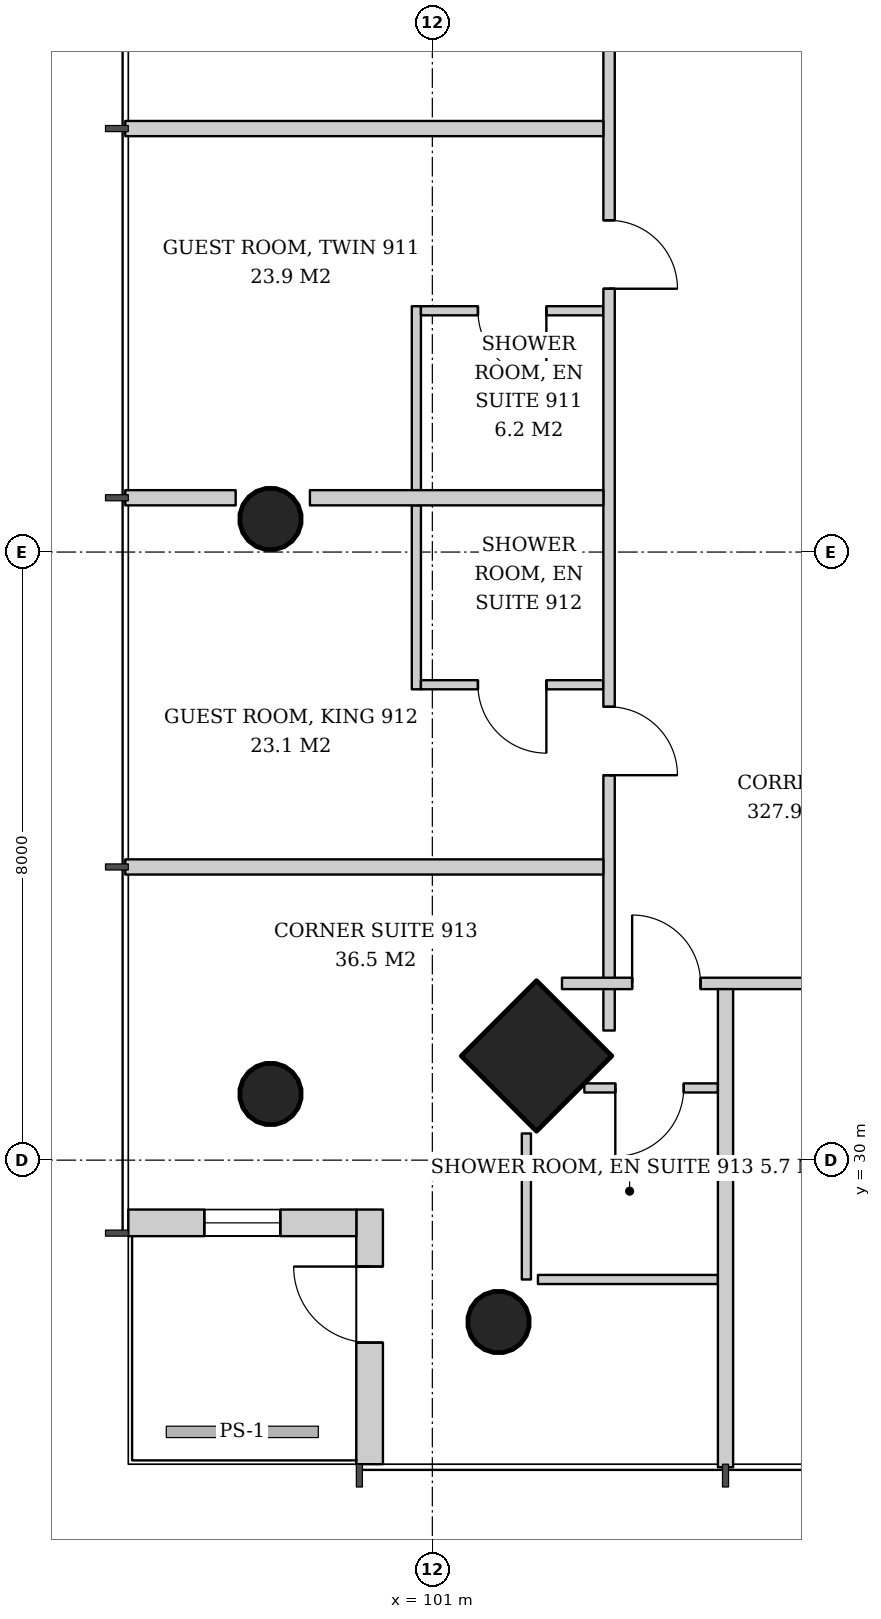
"""IFC4 building model, lengths in metres.
Left out: names, types, materials, properties, quantities, classifications, styles, units other than length and angle.
Written with IfcOpenShell. Run it as: python <this file> out.ifc"""

import sys

from ifc_helpers import new_model, si_unit, direction, frame, frame_2d, origin, origin_2d, place, context, subcontext, project, spatial, rectangle, hollow_circle, extrude, element, fill, save


model = new_model("IFC4")
c1 = context("Model", 3, precision=1e-05, world=origin(), true_north=direction((0.0, 1.0)))
c2 = subcontext(c1, "Body", "Model", "MODEL_VIEW")
j1 = project(units=[si_unit("LENGTHUNIT", "METRE"), si_unit("PLANEANGLEUNIT", "RADIAN")], contexts=[c1])
p1 = place(None, origin())
s1 = spatial("IfcSite", under=j1, at=p1, CompositionType="ELEMENT")
p2 = place(p1, origin())
s2 = spatial("IfcBuilding", under=s1, at=p2, CompositionType="ELEMENT")
p3 = place(p2, frame((0.0, 0.0, 40.0)))
s3 = spatial("IfcBuildingStorey", under=s2, at=p3, CompositionType="ELEMENT", Elevation=40.0)
p4 = place(p3, frame((102.319, 31.319, 0.0), z_axis=(0.043029647111, 0.043029647111, 0.998146732169), x_axis=(-0.707106781187, 0.707106781187, 0.0)))
e1 = element("IfcColumn", 1, at=p4, inside=s3, PredefinedType="COLUMN", context=c2, shape_type="SweptSolid", body=[
    extrude(rectangle(XDim=1.4, YDim=1.4, at=origin_2d()), origin(), (0.0, 0.0, 1.0), 3.807),
])
p5 = place(p3, frame((98.819, 30.819, 0.0), z_axis=(0.043029647111, 0.043029647111, 0.998146732169), x_axis=(-0.707106781187, 0.707106781187, 0.0)))
e2 = element("IfcColumn", 2, at=p5, inside=s3, PredefinedType="COLUMN", context=c2, shape_type="SweptSolid", body=[
    extrude(hollow_circle(Radius=0.406, WallThickness=0.03, at=origin_2d()), origin(), (0.0, 0.0, 1.0), 3.807),
])
p6 = place(p3, frame((98.819, 38.409, 0.0), z_axis=(0.043059525333, 0.021561848751, 0.998839808957), x_axis=(-0.44774654769, 0.894160516368, 0.0)))
e3 = element("IfcColumn", 3, at=p6, inside=s3, PredefinedType="COLUMN", context=c2, shape_type="SweptSolid", body=[
    extrude(hollow_circle(Radius=0.406, WallThickness=0.03, at=origin_2d()), origin(), (0.0, 0.0, 1.0), 3.804),
])
p7 = place(p3, frame((101.819, 27.819, 0.0), z_axis=(0.043029647111, 0.043029647111, 0.998146732169), x_axis=(-0.707106781187, 0.707106781187, 0.0)))
e4 = element("IfcColumn", 4, at=p7, inside=s3, PredefinedType="COLUMN", context=c2, shape_type="SweptSolid", body=[
    extrude(hollow_circle(Radius=0.406, WallThickness=0.03, at=origin_2d()), origin(), (0.0, 0.0, 1.0), 3.807),
])
p8 = place(p3, frame((100.175, 26.0, 0.0), z_axis=(0.0, 0.0, 1.0), x_axis=(0.0, 1.0, 0.0)))
e5 = element("IfcWall", 5, at=p8, inside=s3, PredefinedType="SOLIDWALL", context=c2, shape_type="SweptSolid", body=[
    extrude(rectangle(XDim=3.35, YDim=0.35, at=frame_2d((1.675, 0.0))), origin(), (0.0, 0.0, 1.0), 3.6),
])
p9 = place(p8, frame((1.6, 0.0, 0.0)))
e6 = element("IfcOpeningElement", 6, at=p9, cuts=e5, PredefinedType="OPENING", context=c2, shape_type="SweptSolid", body=[
    extrude(rectangle(XDim=1.0, YDim=2.4, at=frame_2d((0.5, 1.2))), frame((0.0, 0.185, 0.0), z_axis=(0.0, -1.0, 0.0), x_axis=(1.0, 0.0, 0.0)), (0.0, 0.0, 1.0), 0.37),
])
p10 = place(p3, frame((100.0, 29.175, 0.0), z_axis=(0.0, 0.0, 1.0), x_axis=(-1.0, 0.0, 0.0)))
e7 = element("IfcWall", 7, at=p10, inside=s3, PredefinedType="SOLIDWALL", context=c2, shape_type="SweptSolid", body=[
    extrude(rectangle(XDim=3.0, YDim=0.35, at=frame_2d((1.5, 0.0))), origin(), (0.0, 0.0, 1.0), 3.6),
])
p11 = place(p10, frame((1.0, 0.0, 0.9)))
e8 = element("IfcOpeningElement", 8, at=p11, cuts=e7, PredefinedType="OPENING", context=c2, shape_type="SweptSolid", body=[
    extrude(rectangle(XDim=1.0, YDim=2.4, at=frame_2d((0.5, 1.2))), frame((0.0, 0.185, 0.0), z_axis=(0.0, -1.0, 0.0), x_axis=(1.0, 0.0, 0.0)), (0.0, 0.0, 1.0), 0.37),
])
p12 = place(p3, frame((100.79, 41.234, 0.0), z_axis=(0.0, 0.0, 1.0), x_axis=(0.0, -1.0, 0.0)))
e9 = element("IfcWall", 9, at=p12, inside=s3, PredefinedType="PARTITIONING", context=c2, shape_type="SweptSolid", body=[
    extrude(rectangle(XDim=2.42, YDim=0.12, at=frame_2d((1.21, 0.0))), origin(), (0.0, 0.0, 1.0), 3.6),
])
p13 = place(p3, frame((103.25, 41.174, 0.0), z_axis=(0.0, 0.0, 1.0), x_axis=(-1.0, 0.0, 0.0)))
e10 = element("IfcWall", 10, at=p13, inside=s3, PredefinedType="PARTITIONING", context=c2, shape_type="SweptSolid", body=[
    extrude(rectangle(XDim=2.4, YDim=0.12, at=frame_2d((1.2, 0.0))), origin(), (0.0, 0.0, 1.0), 3.6),
])
p14 = place(p13, frame((0.75, 0.0, 0.0)))
e11 = element("IfcOpeningElement", 11, at=p14, cuts=e10, PredefinedType="OPENING", context=c2, shape_type="SweptSolid", body=[
    extrude(rectangle(XDim=0.9, YDim=2.1, at=frame_2d((0.45, 1.05))), frame((0.0, 0.07, 0.0), z_axis=(0.0, -1.0, 0.0), x_axis=(1.0, 0.0, 0.0)), (0.0, 0.0, 1.0), 0.14),
])
p15 = place(p3, frame((100.79, 38.614, 0.0), z_axis=(0.0, 0.0, 1.0), x_axis=(0.0, -1.0, 0.0)))
e12 = element("IfcWall", 12, at=p15, inside=s3, PredefinedType="PARTITIONING", context=c2, shape_type="SweptSolid", body=[
    extrude(rectangle(XDim=2.42, YDim=0.12, at=frame_2d((1.21, 0.0))), origin(), (0.0, 0.0, 1.0), 3.6),
])
p16 = place(p3, frame((103.25, 36.254, 0.0), z_axis=(0.0, 0.0, 1.0), x_axis=(-1.0, 0.0, 0.0)))
e13 = element("IfcWall", 13, at=p16, inside=s3, PredefinedType="PARTITIONING", context=c2, shape_type="SweptSolid", body=[
    extrude(rectangle(XDim=2.4, YDim=0.12, at=frame_2d((1.2, 0.0))), origin(), (0.0, 0.0, 1.0), 3.6),
])
p17 = place(p16, frame((0.75, 0.0, 0.0)))
e14 = element("IfcOpeningElement", 14, at=p17, cuts=e13, PredefinedType="OPENING", context=c2, shape_type="SweptSolid", body=[
    extrude(rectangle(XDim=0.9, YDim=2.1, at=frame_2d((0.45, 1.05))), frame((0.0, 0.07, 0.0), z_axis=(0.0, -1.0, 0.0), x_axis=(1.0, 0.0, 0.0)), (0.0, 0.0, 1.0), 0.14),
])
p18 = place(p3, frame((103.325, 60.294, 0.0), z_axis=(0.0, 0.0, 1.0), x_axis=(0.0, -1.0, 0.0)))
e15 = element("IfcWall", 15, at=p18, inside=s3, PredefinedType="PARTITIONING", context=c2, shape_type="SweptSolid", body=[
    extrude(rectangle(XDim=28.589, YDim=0.15, at=frame_2d((14.294, 0.0))), origin(), (0.0, 0.0, 1.0), 2.8),
])
p19 = place(p18, frame((0.923, 0.0, 0.0)))
e16 = element("IfcOpeningElement", 16, at=p19, cuts=e15, PredefinedType="OPENING", context=c2, shape_type="SweptSolid", body=[
    extrude(rectangle(XDim=0.9, YDim=2.1, at=frame_2d((0.45, 1.05))), frame((0.0, 0.085, 0.0), z_axis=(0.0, -1.0, 0.0), x_axis=(1.0, 0.0, 0.0)), (0.0, 0.0, 1.0), 0.17),
])
p20 = place(p18, frame((4.852, 0.0, 0.0)))
e17 = element("IfcOpeningElement", 17, at=p20, cuts=e15, PredefinedType="OPENING", context=c2, shape_type="SweptSolid", body=[
    extrude(rectangle(XDim=1.0, YDim=2.1, at=frame_2d((0.5, 1.05))), frame((0.0, 0.085, 0.0), z_axis=(0.0, -1.0, 0.0), x_axis=(1.0, 0.0, 0.0)), (0.0, 0.0, 1.0), 0.17),
])
p21 = place(p18, frame((9.759, 0.0, 0.0)))
e18 = element("IfcOpeningElement", 18, at=p21, cuts=e15, PredefinedType="OPENING", context=c2, shape_type="SweptSolid", body=[
    extrude(rectangle(XDim=0.9, YDim=2.1, at=frame_2d((0.45, 1.05))), frame((0.0, 0.085, 0.0), z_axis=(0.0, -1.0, 0.0), x_axis=(1.0, 0.0, 0.0)), (0.0, 0.0, 1.0), 0.17),
])
p22 = place(p18, frame((17.93, 0.0, 0.0)))
e19 = element("IfcOpeningElement", 19, at=p22, cuts=e15, PredefinedType="OPENING", context=c2, shape_type="SweptSolid", body=[
    extrude(rectangle(XDim=0.9, YDim=2.1, at=frame_2d((0.45, 1.05))), frame((0.0, 0.085, 0.0), z_axis=(0.0, -1.0, 0.0), x_axis=(1.0, 0.0, 0.0)), (0.0, 0.0, 1.0), 0.17),
])
p23 = place(p18, frame((24.33, 0.0, 0.0)))
e20 = element("IfcOpeningElement", 20, at=p23, cuts=e15, PredefinedType="OPENING", context=c2, shape_type="SweptSolid", body=[
    extrude(rectangle(XDim=0.9, YDim=2.1, at=frame_2d((0.45, 1.05))), frame((0.0, 0.085, 0.0), z_axis=(0.0, -1.0, 0.0), x_axis=(1.0, 0.0, 0.0)), (0.0, 0.0, 1.0), 0.17),
])
p24 = place(p3, frame((103.25, 43.572, 0.0), z_axis=(0.0, 0.0, 1.0), x_axis=(-1.0, 0.0, 0.0)))
e21 = element("IfcWall", 21, at=p24, inside=s3, PredefinedType="PARTITIONING", context=c2, shape_type="SweptSolid", body=[
    extrude(rectangle(XDim=6.29, YDim=0.2, at=frame_2d((3.145, 0.0))), origin(), (0.0, 0.0, 1.0), 3.05),
])
p25 = place(p3, frame((103.25, 38.714, 0.0), z_axis=(0.0, 0.0, 1.0), x_axis=(-1.0, 0.0, 0.0)))
e22 = element("IfcWall", 22, at=p25, inside=s3, PredefinedType="PARTITIONING", context=c2, shape_type="SweptSolid", body=[
    extrude(rectangle(XDim=3.861, YDim=0.2, at=frame_2d((1.93, 0.0))), origin(), (0.0, 0.0, 1.0), 3.6),
])
p26 = place(p3, frame((98.412, 38.714, 0.0), z_axis=(0.0, 0.0, 1.0), x_axis=(-1.0, 0.0, 0.0)))
e23 = element("IfcWall", 23, at=p26, inside=s3, PredefinedType="PARTITIONING", context=c2, shape_type="SweptSolid", body=[
    extrude(rectangle(XDim=1.452, YDim=0.2, at=frame_2d((0.726, 0.0))), origin(), (0.0, 0.0, 1.0), 3.6),
])
p27 = place(p3, frame((103.25, 33.857, 0.0), z_axis=(0.0, 0.0, 1.0), x_axis=(-1.0, 0.0, 0.0)))
e24 = element("IfcWall", 24, at=p27, inside=s3, PredefinedType="PARTITIONING", context=c2, shape_type="SweptSolid", body=[
    extrude(rectangle(XDim=6.29, YDim=0.2, at=frame_2d((3.145, 0.0))), origin(), (0.0, 0.0, 1.0), 3.05),
])
p28 = place(p3, frame((104.757, 30.95, 0.0), z_axis=(0.0, 0.0, 1.0), x_axis=(-1.0, 0.0, 0.0)))
e25 = element("IfcWall", 25, at=p28, inside=s3, PredefinedType="PARTITIONING", context=c2, shape_type="SweptSolid", body=[
    extrude(rectangle(XDim=1.757, YDim=0.12, at=frame_2d((0.878, 0.0))), origin(), (0.0, 0.0, 1.0), 3.6),
])
p29 = place(p28, frame((0.45, 0.0, 0.0)))
e26 = element("IfcOpeningElement", 26, at=p29, cuts=e25, PredefinedType="OPENING", context=c2, shape_type="SweptSolid", body=[
    extrude(rectangle(XDim=0.9, YDim=2.1, at=frame_2d((0.45, 1.05))), frame((0.0, 0.07, 0.0), z_axis=(0.0, -1.0, 0.0), x_axis=(1.0, 0.0, 0.0)), (0.0, 0.0, 1.0), 0.14),
])
p30 = place(p3, frame((104.757, 28.43, 0.0), z_axis=(0.0, 0.0, 1.0), x_axis=(-1.0, 0.0, 0.0)))
e27 = element("IfcWall", 27, at=p30, inside=s3, PredefinedType="PARTITIONING", context=c2, shape_type="SweptSolid", body=[
    extrude(rectangle(XDim=2.368, YDim=0.12, at=frame_2d((1.184, 0.0))), origin(), (0.0, 0.0, 1.0), 3.6),
])
p31 = place(p3, frame((102.237, 30.351, 0.0), z_axis=(0.0, 0.0, 1.0), x_axis=(0.0, -1.0, 0.0)))
e28 = element("IfcWall", 28, at=p31, inside=s3, PredefinedType="PARTITIONING", context=c2, shape_type="SweptSolid", body=[
    extrude(rectangle(XDim=1.921, YDim=0.12, at=frame_2d((0.96, 0.0))), origin(), (0.0, 0.0, 1.0), 3.2),
])
p32 = place(p3, frame((102.706, 32.325, 0.0), z_axis=(0.0, 0.0, 1.0), x_axis=(1.0, 0.0, 0.0)))
e29 = element("IfcWall", 29, at=p32, inside=s3, PredefinedType="PARTITIONING", context=c2, shape_type="SweptSolid", body=[
    extrude(rectangle(XDim=28.589, YDim=0.15, at=frame_2d((14.294, 0.0))), origin(), (0.0, 0.0, 1.0), 2.8),
])
p33 = place(p32, frame((0.923, 0.0, 0.0)))
e30 = element("IfcOpeningElement", 30, at=p33, cuts=e29, PredefinedType="OPENING", context=c2, shape_type="SweptSolid", body=[
    extrude(rectangle(XDim=0.9, YDim=2.1, at=frame_2d((0.45, 1.05))), frame((0.0, 0.085, 0.0), z_axis=(0.0, -1.0, 0.0), x_axis=(1.0, 0.0, 0.0)), (0.0, 0.0, 1.0), 0.17),
])
p34 = place(p32, frame((3.359, 0.0, 0.0)))
e31 = element("IfcOpeningElement", 31, at=p34, cuts=e29, PredefinedType="OPENING", context=c2, shape_type="SweptSolid", body=[
    extrude(rectangle(XDim=0.9, YDim=2.1, at=frame_2d((0.45, 1.05))), frame((0.0, 0.085, 0.0), z_axis=(0.0, -1.0, 0.0), x_axis=(1.0, 0.0, 0.0)), (0.0, 0.0, 1.0), 0.17),
])
p35 = place(p32, frame((9.759, 0.0, 0.0)))
e32 = element("IfcOpeningElement", 32, at=p35, cuts=e29, PredefinedType="OPENING", context=c2, shape_type="SweptSolid", body=[
    extrude(rectangle(XDim=0.9, YDim=2.1, at=frame_2d((0.45, 1.05))), frame((0.0, 0.085, 0.0), z_axis=(0.0, -1.0, 0.0), x_axis=(1.0, 0.0, 0.0)), (0.0, 0.0, 1.0), 0.17),
])
p36 = place(p32, frame((13.073, 0.0, 0.0)))
e33 = element("IfcOpeningElement", 33, at=p36, cuts=e29, PredefinedType="OPENING", context=c2, shape_type="SweptSolid", body=[
    extrude(rectangle(XDim=0.9, YDim=2.1, at=frame_2d((0.45, 1.05))), frame((0.0, 0.085, 0.0), z_axis=(0.0, -1.0, 0.0), x_axis=(1.0, 0.0, 0.0)), (0.0, 0.0, 1.0), 0.17),
])
p37 = place(p32, frame((19.473, 0.0, 0.0)))
e34 = element("IfcOpeningElement", 34, at=p37, cuts=e29, PredefinedType="OPENING", context=c2, shape_type="SweptSolid", body=[
    extrude(rectangle(XDim=0.9, YDim=2.1, at=frame_2d((0.45, 1.05))), frame((0.0, 0.085, 0.0), z_axis=(0.0, -1.0, 0.0), x_axis=(1.0, 0.0, 0.0)), (0.0, 0.0, 1.0), 0.17),
])
p38 = place(p32, frame((22.787, 0.0, 0.0)))
e35 = element("IfcOpeningElement", 35, at=p38, cuts=e29, PredefinedType="OPENING", context=c2, shape_type="SweptSolid", body=[
    extrude(rectangle(XDim=0.9, YDim=2.1, at=frame_2d((0.45, 1.05))), frame((0.0, 0.085, 0.0), z_axis=(0.0, -1.0, 0.0), x_axis=(1.0, 0.0, 0.0)), (0.0, 0.0, 1.0), 0.17),
])
p39 = place(p3, frame((104.857, 32.25, 0.0), z_axis=(0.0, 0.0, 1.0), x_axis=(0.0, -1.0, 0.0)))
e36 = element("IfcWall", 36, at=p39, inside=s3, PredefinedType="PARTITIONING", context=c2, shape_type="SweptSolid", body=[
    extrude(rectangle(XDim=6.29, YDim=0.2, at=frame_2d((3.145, 0.0))), origin(), (0.0, 0.0, 1.0), 3.05),
])
p40 = place(p9, origin())
e37 = element("IfcDoor", 37, at=p40, inside=s3, OperationType="SINGLE_SWING_RIGHT", PredefinedType="DOOR", context=c2, shape_type="SweptSolid", body=[
    extrude(rectangle(XDim=1.0, YDim=2.4, at=frame_2d((0.5, 1.2))), frame((0.0, 0.025, 0.0), z_axis=(0.0, -1.0, 0.0), x_axis=(1.0, 0.0, 0.0)), (0.0, 0.0, 1.0), 0.05),
])
fill(e6, e37)
p41 = place(p11, origin())
e38 = element("IfcWindow", 38, at=p41, inside=s3, PartitioningType="SINGLE_PANEL", PredefinedType="WINDOW", context=c2, shape_type="SweptSolid", body=[
    extrude(rectangle(XDim=1.0, YDim=2.4, at=frame_2d((0.5, 1.2))), frame((0.0, 0.03, 0.0), z_axis=(0.0, -1.0, 0.0), x_axis=(1.0, 0.0, 0.0)), (0.0, 0.0, 1.0), 0.06),
])
fill(e8, e38)
p42 = place(p14, origin())
e39 = element("IfcDoor", 39, at=p42, inside=s3, OperationType="SINGLE_SWING_LEFT", PredefinedType="DOOR", context=c2, shape_type="SweptSolid", body=[
    extrude(rectangle(XDim=0.9, YDim=2.1, at=frame_2d((0.45, 1.05))), frame((0.0, 0.025, 0.0), z_axis=(0.0, -1.0, 0.0), x_axis=(1.0, 0.0, 0.0)), (0.0, 0.0, 1.0), 0.05),
])
fill(e11, e39)
p43 = place(p17, origin())
e40 = element("IfcDoor", 40, at=p43, inside=s3, OperationType="SINGLE_SWING_LEFT", PredefinedType="DOOR", context=c2, shape_type="SweptSolid", body=[
    extrude(rectangle(XDim=0.9, YDim=2.1, at=frame_2d((0.45, 1.05))), frame((0.0, 0.025, 0.0), z_axis=(0.0, -1.0, 0.0), x_axis=(1.0, 0.0, 0.0)), (0.0, 0.0, 1.0), 0.05),
])
fill(e14, e40)
p44 = place(p22, origin())
e41 = element("IfcDoor", 41, at=p44, inside=s3, OperationType="SINGLE_SWING_RIGHT", PredefinedType="DOOR", context=c2, shape_type="SweptSolid", body=[
    extrude(rectangle(XDim=0.9, YDim=2.1, at=frame_2d((0.45, 1.05))), frame((0.0, 0.025, 0.0), z_axis=(0.0, -1.0, 0.0), x_axis=(1.0, 0.0, 0.0)), (0.0, 0.0, 1.0), 0.05),
])
fill(e19, e41)
p45 = place(p23, origin())
e42 = element("IfcDoor", 42, at=p45, inside=s3, OperationType="SINGLE_SWING_RIGHT", PredefinedType="DOOR", context=c2, shape_type="SweptSolid", body=[
    extrude(rectangle(XDim=0.9, YDim=2.1, at=frame_2d((0.45, 1.05))), frame((0.0, 0.025, 0.0), z_axis=(0.0, -1.0, 0.0), x_axis=(1.0, 0.0, 0.0)), (0.0, 0.0, 1.0), 0.05),
])
fill(e20, e42)
p46 = place(p29, origin())
e43 = element("IfcDoor", 43, at=p46, inside=s3, OperationType="SINGLE_SWING_RIGHT", PredefinedType="DOOR", context=c2, shape_type="SweptSolid", body=[
    extrude(rectangle(XDim=0.9, YDim=2.1, at=frame_2d((0.45, 1.05))), frame((0.0, 0.025, 0.0), z_axis=(0.0, -1.0, 0.0), x_axis=(1.0, 0.0, 0.0)), (0.0, 0.0, 1.0), 0.05),
])
fill(e26, e43)
p47 = place(p33, origin())
e44 = element("IfcDoor", 44, at=p47, inside=s3, OperationType="SINGLE_SWING_LEFT", PredefinedType="DOOR", context=c2, shape_type="SweptSolid", body=[
    extrude(rectangle(XDim=0.9, YDim=2.1, at=frame_2d((0.45, 1.05))), frame((0.0, 0.025, 0.0), z_axis=(0.0, -1.0, 0.0), x_axis=(1.0, 0.0, 0.0)), (0.0, 0.0, 1.0), 0.05),
])
fill(e30, e44)
save(model, sys.argv[1])
